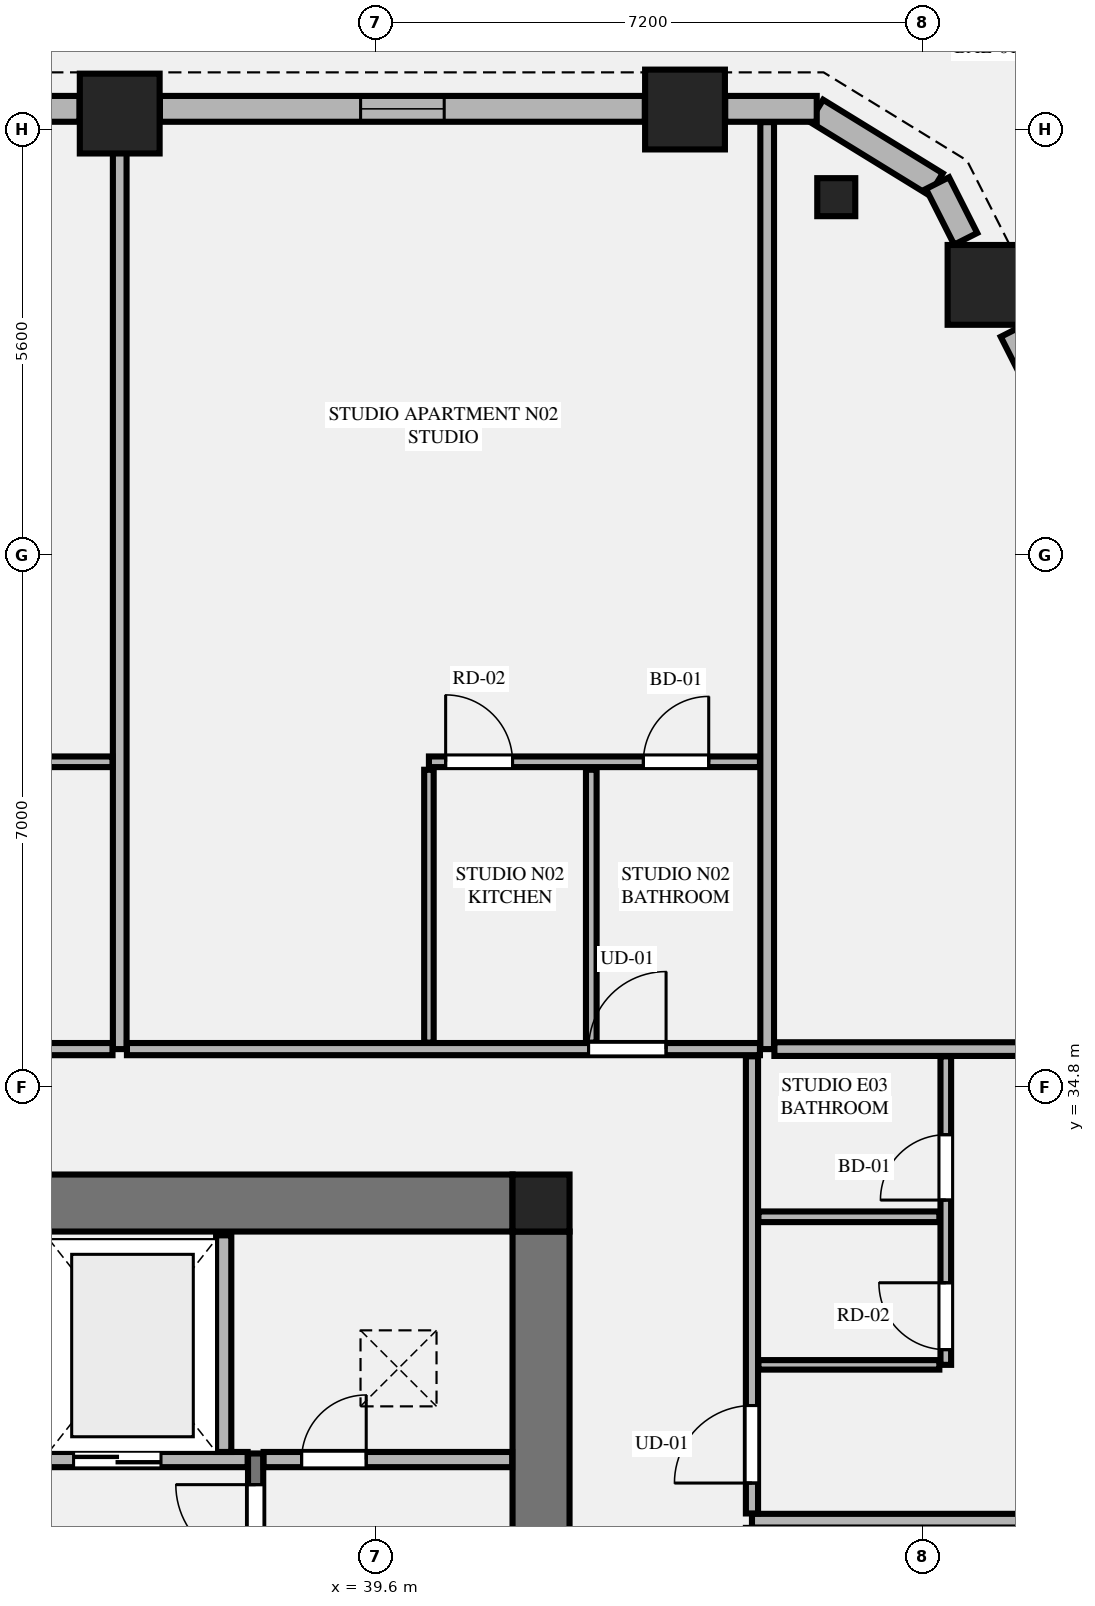
"""IFC4 building model, lengths in metres.
Left out: names, types, materials, properties, quantities, classifications, styles, units other than length and angle.
Written with IfcOpenShell. Run it as: python <this file> out.ifc"""

import sys

from ifc_helpers import new_model, si_unit, direction, frame, frame_2d, origin, origin_2d, place, context, subcontext, project, spatial, rectangle, extrude, element, fill, save


model = new_model("IFC4")
c1 = context("Model", 3, precision=1e-05, world=origin(), true_north=direction((0.0, 1.0)))
c2 = subcontext(c1, "Body", "Model", "MODEL_VIEW")
j1 = project(units=[si_unit("LENGTHUNIT", "METRE"), si_unit("PLANEANGLEUNIT", "RADIAN")], contexts=[c1])
p1 = place(None, origin())
s1 = spatial("IfcSite", under=j1, at=p1, CompositionType="ELEMENT")
p2 = place(p1, origin())
s2 = spatial("IfcBuilding", under=s1, at=p2, CompositionType="ELEMENT")
p3 = place(p2, frame((0.0, 0.0, 98.4)))
s3 = spatial("IfcBuildingStorey", under=s2, at=p3, CompositionType="ELEMENT", Elevation=98.4)
p4 = place(p3, frame((41.775, 33.275, 0.0), z_axis=(0.0, 0.0, 1.0), x_axis=(1.0, 0.0, 0.0)))
e1 = element("IfcColumn", 1, at=p4, inside=s3, PredefinedType="COLUMN", context=c2, shape_type="SweptSolid", body=[
    extrude(rectangle(XDim=0.75, YDim=0.75, at=origin_2d()), origin(), (0.0, 0.0, 1.0), 3.55),
])
p5 = place(p3, frame((23.4, 33.275, 0.0), z_axis=(0.0, 0.0, 1.0), x_axis=(1.0, 0.0, 0.0)))
e2 = element("IfcWall", 2, at=p5, inside=s3, PredefinedType="SHEAR", context=c2, shape_type="SweptSolid", body=[
    extrude(rectangle(XDim=18.0, YDim=0.75, at=frame_2d((9.0, 0.0))), origin(), (0.0, 0.0, 1.0), 3.34),
])
p6 = place(p3, frame((41.775, 18.9, 0.0), z_axis=(0.0, 0.0, 1.0), x_axis=(0.0, 1.0, 0.0)))
e3 = element("IfcWall", 3, at=p6, inside=s3, PredefinedType="SHEAR", context=c2, shape_type="SweptSolid", body=[
    extrude(rectangle(XDim=14.0, YDim=0.75, at=frame_2d((7.0, 0.0))), origin(), (0.0, 0.0, 1.0), 3.34),
])
p7 = place(p6, frame((2.94, 0.0, 0.0)))
e4 = element("IfcOpeningElement", 4, at=p7, cuts=e3, PredefinedType="OPENING", context=c2, shape_type="SweptSolid", body=[
    extrude(rectangle(XDim=1.22, YDim=2.25, at=frame_2d((0.61, 1.125))), frame((0.0, 0.385, 0.0), z_axis=(0.0, -1.0, 0.0), x_axis=(1.0, 0.0, 0.0)), (0.0, 0.0, 1.0), 0.77),
])
for number, where, z_axis, x_axis in (
    (5, (47.649, 45.354, 0.0), (0.0, 0.0, 1.0), (1.0, 0.0, 0.0)),
    (6, (43.669, 47.661, 0.0), (0.0, 0.0, 1.0), (1.0, 0.0, 0.0)),
    (7, (36.232, 47.608, 0.0), (0.0, 0.0, 1.0), (1.0, 0.0, 0.0)),
):
    element("IfcColumn", number, at=place(p3, frame(where, z_axis=z_axis, x_axis=x_axis)), inside=s3, PredefinedType="COLUMN", context=c2, shape_type="SweptSolid", body=[
        extrude(rectangle(XDim=1.05, YDim=1.05, at=origin_2d()), origin(), (0.0, 0.0, 1.0), 3.55),
    ])
p8 = place(p3, frame((45.659, 46.508, 0.0), z_axis=(0.0, 0.0, 1.0), x_axis=(-0.865160173452, 0.501495637342, 0.0)))
e8 = element("IfcColumn", 8, at=p8, inside=s3, PredefinedType="PILASTER", context=c2, shape_type="SweptSolid", body=[
    extrude(rectangle(XDim=0.5, YDim=0.35, at=origin_2d()), origin(), (0.0, 0.0, 1.0), 3.55),
])
p9 = place(p3, frame((38.02, 23.2, 0.0), z_axis=(0.0, 0.0, 1.0), x_axis=(0.0, 1.0, 0.0)))
e9 = element("IfcWall", 9, at=p9, inside=s3, PredefinedType="SHEAR", context=c2, shape_type="SweptSolid", body=[
    extrude(rectangle(XDim=6.78, YDim=0.2, at=frame_2d((3.39, 0.0))), origin(), (0.0, 0.0, 1.0), 3.55),
])
p10 = place(p9, frame((5.32, 0.0, 0.0)))
e10 = element("IfcOpeningElement", 10, at=p10, cuts=e9, PredefinedType="OPENING", context=c2, shape_type="SweptSolid", body=[
    extrude(rectangle(XDim=1.05, YDim=2.15, at=frame_2d((0.525, 1.075))), frame((0.0, 0.11, 0.0), z_axis=(0.0, -1.0, 0.0), x_axis=(1.0, 0.0, 0.0)), (0.0, 0.0, 1.0), 0.22),
])
p11 = place(p3, frame((34.9, 29.9, 0.0), z_axis=(0.0, 0.0, 1.0), x_axis=(1.0, 0.0, 0.0)))
e11 = element("IfcWall", 11, at=p11, inside=s3, PredefinedType="PLUMBINGWALL", context=c2, shape_type="SweptSolid", body=[
    extrude(rectangle(XDim=3.015, YDim=0.2, at=frame_2d((1.508, 0.0))), origin(), (0.0, 0.0, 1.0), 3.34),
])
p12 = place(p11, frame((0.725, 0.0, 0.0)))
e12 = element("IfcOpeningElement", 12, at=p12, cuts=e11, PredefinedType="OPENING", context=c2, shape_type="SweptSolid", body=[
    extrude(rectangle(XDim=1.15, YDim=2.2, at=frame_2d((0.575, 1.1))), frame((0.0, 0.11, 0.0), z_axis=(0.0, -1.0, 0.0), x_axis=(1.0, 0.0, 0.0)), (0.0, 0.0, 1.0), 0.22),
])
p13 = place(p3, frame((38.125, 29.9, 0.0), z_axis=(0.0, 0.0, 1.0), x_axis=(1.0, 0.0, 0.0)))
e13 = element("IfcWall", 13, at=p13, inside=s3, PredefinedType="PLUMBINGWALL", context=c2, shape_type="SweptSolid", body=[
    extrude(rectangle(XDim=3.27, YDim=0.2, at=frame_2d((1.635, 0.0))), origin(), (0.0, 0.0, 1.0), 3.34),
])
p14 = place(p13, frame((0.5, 0.0, 0.0)))
e14 = element("IfcOpeningElement", 14, at=p14, cuts=e13, PredefinedType="OPENING", context=c2, shape_type="SweptSolid", body=[
    extrude(rectangle(XDim=0.85, YDim=2.05, at=frame_2d((0.425, 1.025))), frame((0.0, 0.11, 0.0), z_axis=(0.0, -1.0, 0.0), x_axis=(1.0, 0.0, 0.0)), (0.0, 0.0, 1.0), 0.22),
])
p15 = place(p3, frame((37.6, 30.0, 0.0), z_axis=(0.0, 0.0, 1.0), x_axis=(0.0, 1.0, 0.0)))
e15 = element("IfcWall", 15, at=p15, inside=s3, PredefinedType="PLUMBINGWALL", context=c2, shape_type="SweptSolid", body=[
    extrude(rectangle(XDim=2.85, YDim=0.2, at=frame_2d((1.425, 0.0))), origin(), (0.0, 0.0, 1.0), 3.34),
])
p16 = place(p3, frame((46.971, 46.677, 0.0), z_axis=(0.0, 0.0, 1.0), x_axis=(-0.851798915137, 0.523868884523, 0.0)))
e16 = element("IfcWall", 16, at=p16, inside=s3, PredefinedType="STANDARD", context=c2, shape_type="SweptSolid", body=[
    extrude(rectangle(XDim=1.848, YDim=0.34, at=frame_2d((0.924, 0.0))), origin(), (0.0, 0.0, 1.0), 3.34),
])
p17 = place(p3, frame((50.251, 40.251, 0.0), z_axis=(0.0, 0.0, 1.0), x_axis=(-0.451548465867, 0.892246593142, 0.0)))
e17 = element("IfcWall", 17, at=p17, inside=s3, PredefinedType="STANDARD", context=c2, shape_type="SweptSolid", body=[
    extrude(rectangle(XDim=5.04, YDim=0.34, at=frame_2d((2.52, 0.0))), origin(), (0.0, 0.0, 1.0), 2.797),
])
p18 = place(p17, frame((1.97, 0.0, 0.75)))
e18 = element("IfcOpeningElement", 18, at=p18, cuts=e17, PredefinedType="OPENING", context=c2, shape_type="SweptSolid", body=[
    extrude(rectangle(XDim=1.1, YDim=1.897, at=frame_2d((0.55, 0.948))), frame((0.0, 0.18, 0.0), z_axis=(0.0, -1.0, 0.0), x_axis=(1.0, 0.0, 0.0)), (0.0, 0.0, 1.0), 0.36),
])
p19 = place(p3, frame((47.362, 45.96, 0.0), z_axis=(0.0, 0.0, 1.0), x_axis=(-0.45160540153, 0.89221777684, 0.0)))
e19 = element("IfcWall", 19, at=p19, inside=s3, PredefinedType="STANDARD", context=c2, shape_type="SweptSolid", body=[
    extrude(rectangle(XDim=0.822, YDim=0.34, at=frame_2d((0.411, 0.0))), origin(), (0.0, 0.0, 1.0), 3.34),
])
p20 = place(p3, frame((45.402, 47.67, 0.0), z_axis=(0.0, 0.0, 1.0), x_axis=(-1.0, 0.0, 0.0)))
e20 = element("IfcWall", 20, at=p20, inside=s3, PredefinedType="STANDARD", context=c2, shape_type="SweptSolid", body=[
    extrude(rectangle(XDim=1.204, YDim=0.34, at=frame_2d((0.602, 0.0))), origin(), (0.0, 0.0, 1.0), 3.34),
])
p21 = place(p3, frame((43.14, 47.67, 0.0), z_axis=(0.0, 0.0, 1.0), x_axis=(-1.0, 0.0, 0.0)))
e21 = element("IfcWall", 21, at=p21, inside=s3, PredefinedType="STANDARD", context=c2, shape_type="SweptSolid", body=[
    extrude(rectangle(XDim=6.379, YDim=0.34, at=frame_2d((3.189, 0.0))), origin(), (0.0, 0.0, 1.0), 2.797),
])
p22 = place(p21, frame((2.639, 0.0, 0.75)))
e22 = element("IfcOpeningElement", 22, at=p22, cuts=e21, PredefinedType="OPENING", context=c2, shape_type="SweptSolid", body=[
    extrude(rectangle(XDim=1.1, YDim=1.897, at=frame_2d((0.55, 0.948))), frame((0.0, 0.18, 0.0), z_axis=(0.0, -1.0, 0.0), x_axis=(1.0, 0.0, 0.0)), (0.0, 0.0, 1.0), 0.36),
])
p23 = place(p3, frame((35.703, 47.67, 0.0), z_axis=(0.0, 0.0, 1.0), x_axis=(-1.0, 0.0, 0.0)))
e23 = element("IfcWall", 23, at=p23, inside=s3, PredefinedType="STANDARD", context=c2, shape_type="SweptSolid", body=[
    extrude(rectangle(XDim=6.606, YDim=0.34, at=frame_2d((3.303, 0.0))), origin(), (0.0, 0.0, 1.0), 2.797),
])
p24 = place(p23, frame((2.553, 0.0, 0.0)))
e24 = element("IfcOpeningElement", 24, at=p24, cuts=e23, PredefinedType="OPENING", context=c2, shape_type="SweptSolid", body=[
    extrude(rectangle(XDim=1.5, YDim=2.3, at=frame_2d((0.75, 1.15))), frame((0.0, 0.18, 0.0), z_axis=(0.0, -1.0, 0.0), x_axis=(1.0, 0.0, 0.0)), (0.0, 0.0, 1.0), 0.36),
])
p25 = place(p3, frame((36.232, 35.3, 0.0), z_axis=(0.0, 0.0, 1.0), x_axis=(0.0, 1.0, 0.0)))
e25 = element("IfcWall", 25, at=p25, inside=s3, PredefinedType="PARTITIONING", context=c2, shape_type="SweptSolid", body=[
    extrude(rectangle(XDim=12.195, YDim=0.18, at=frame_2d((6.098, 0.0))), origin(), (0.0, 0.0, 1.0), 2.722),
])
p26 = place(p3, frame((44.75, 35.3, 0.0), z_axis=(0.0, 0.0, 1.0), x_axis=(0.0, 1.0, 0.0)))
e26 = element("IfcWall", 26, at=p26, inside=s3, PredefinedType="PARTITIONING", context=c2, shape_type="SweptSolid", body=[
    extrude(rectangle(XDim=12.195, YDim=0.18, at=frame_2d((6.098, 0.0))), origin(), (0.0, 0.0, 1.0), 3.34),
])
p27 = place(p3, frame((20.145, 35.3, 0.0), z_axis=(0.0, 0.0, 1.0), x_axis=(1.0, 0.0, 0.0)))
e27 = element("IfcWall", 27, at=p27, inside=s3, PredefinedType="PARTITIONING", context=c2, shape_type="SweptSolid", body=[
    extrude(rectangle(XDim=15.992, YDim=0.16, at=frame_2d((7.996, 0.0))), origin(), (0.0, 0.0, 1.0), 3.34),
])
p28 = place(p27, frame((0.405, 0.0, 0.0)))
e28 = element("IfcOpeningElement", 28, at=p28, cuts=e27, PredefinedType="OPENING", context=c2, shape_type="SweptSolid", body=[
    extrude(rectangle(XDim=1.02, YDim=2.25, at=frame_2d((0.51, 1.125))), frame((0.0, 0.09, 0.0), z_axis=(0.0, -1.0, 0.0), x_axis=(1.0, 0.0, 0.0)), (0.0, 0.0, 1.0), 0.18),
])
p29 = place(p3, frame((22.1, 39.08, 0.0), z_axis=(0.0, 0.0, 1.0), x_axis=(1.0, 0.0, 0.0)))
e29 = element("IfcWall", 29, at=p29, inside=s3, PredefinedType="PLUMBINGWALL", context=c2, shape_type="SweptSolid", body=[
    extrude(rectangle(XDim=14.037, YDim=0.14, at=frame_2d((7.019, 0.0))), origin(), (0.0, 0.0, 1.0), 3.34),
])
p30 = place(p29, frame((3.68, 0.0, 0.0)))
e30 = element("IfcOpeningElement", 30, at=p30, cuts=e29, PredefinedType="OPENING", context=c2, shape_type="SweptSolid", body=[
    extrude(rectangle(XDim=0.86, YDim=2.1, at=frame_2d((0.43, 1.05))), frame((0.0, 0.08, 0.0), z_axis=(0.0, -1.0, 0.0), x_axis=(1.0, 0.0, 0.0)), (0.0, 0.0, 1.0), 0.16),
])
p31 = place(p29, frame((7.492, 0.0, 0.0)))
e31 = element("IfcOpeningElement", 31, at=p31, cuts=e29, PredefinedType="OPENING", context=c2, shape_type="SweptSolid", body=[
    extrude(rectangle(XDim=0.88, YDim=2.15, at=frame_2d((0.44, 1.075))), frame((0.0, 0.08, 0.0), z_axis=(0.0, -1.0, 0.0), x_axis=(1.0, 0.0, 0.0)), (0.0, 0.0, 1.0), 0.16),
])
p32 = place(p29, frame((0.22, 0.0, 0.0)))
e32 = element("IfcOpeningElement", 32, at=p32, cuts=e29, PredefinedType="OPENING", context=c2, shape_type="SweptSolid", body=[
    extrude(rectangle(XDim=0.88, YDim=2.15, at=frame_2d((0.44, 1.075))), frame((0.0, 0.08, 0.0), z_axis=(0.0, -1.0, 0.0), x_axis=(1.0, 0.0, 0.0)), (0.0, 0.0, 1.0), 0.16),
])
p33 = place(p3, frame((36.327, 35.3, 0.0), z_axis=(0.0, 0.0, 1.0), x_axis=(1.0, 0.0, 0.0)))
e33 = element("IfcWall", 33, at=p33, inside=s3, PredefinedType="PARTITIONING", context=c2, shape_type="SweptSolid", body=[
    extrude(rectangle(XDim=8.328, YDim=0.16, at=frame_2d((4.164, 0.0))), origin(), (0.0, 0.0, 1.0), 3.34),
])
p34 = place(p33, frame((6.073, 0.0, 0.0)))
e34 = element("IfcOpeningElement", 34, at=p34, cuts=e33, PredefinedType="OPENING", context=c2, shape_type="SweptSolid", body=[
    extrude(rectangle(XDim=1.02, YDim=2.25, at=frame_2d((0.51, 1.125))), frame((0.0, 0.09, 0.0), z_axis=(0.0, -1.0, 0.0), x_axis=(1.0, 0.0, 0.0)), (0.0, 0.0, 1.0), 0.18),
])
p35 = place(p3, frame((40.3, 35.385, 0.0), z_axis=(0.0, 0.0, 1.0), x_axis=(0.0, 1.0, 0.0)))
e35 = element("IfcWall", 35, at=p35, inside=s3, PredefinedType="PARTITIONING", context=c2, shape_type="SweptSolid", body=[
    extrude(rectangle(XDim=3.59, YDim=0.125, at=frame_2d((1.795, 0.0))), origin(), (0.0, 0.0, 1.0), 3.34),
])
p36 = place(p3, frame((40.3, 39.08, 0.0), z_axis=(0.0, 0.0, 1.0), x_axis=(1.0, 0.0, 0.0)))
e36 = element("IfcWall", 36, at=p36, inside=s3, PredefinedType="PLUMBINGWALL", context=c2, shape_type="SweptSolid", body=[
    extrude(rectangle(XDim=4.355, YDim=0.14, at=frame_2d((2.177, 0.0))), origin(), (0.0, 0.0, 1.0), 3.34),
])
p37 = place(p36, frame((2.821, 0.0, 0.0)))
e37 = element("IfcOpeningElement", 37, at=p37, cuts=e36, PredefinedType="OPENING", context=c2, shape_type="SweptSolid", body=[
    extrude(rectangle(XDim=0.86, YDim=2.1, at=frame_2d((0.43, 1.05))), frame((0.0, 0.08, 0.0), z_axis=(0.0, -1.0, 0.0), x_axis=(1.0, 0.0, 0.0)), (0.0, 0.0, 1.0), 0.16),
])
p38 = place(p36, frame((0.22, 0.0, 0.0)))
e38 = element("IfcOpeningElement", 38, at=p38, cuts=e36, PredefinedType="OPENING", context=c2, shape_type="SweptSolid", body=[
    extrude(rectangle(XDim=0.88, YDim=2.15, at=frame_2d((0.44, 1.075))), frame((0.0, 0.08, 0.0), z_axis=(0.0, -1.0, 0.0), x_axis=(1.0, 0.0, 0.0)), (0.0, 0.0, 1.0), 0.16),
])
p39 = place(p3, frame((42.436, 35.385, 0.0), z_axis=(0.0, 0.0, 1.0), x_axis=(0.0, 1.0, 0.0)))
e39 = element("IfcWall", 39, at=p39, inside=s3, PredefinedType="PLUMBINGWALL", context=c2, shape_type="SweptSolid", body=[
    extrude(rectangle(XDim=3.59, YDim=0.14, at=frame_2d((1.795, 0.0))), origin(), (0.0, 0.0, 1.0), 2.722),
])
p40 = place(p3, frame((44.845, 35.3, 0.0), z_axis=(0.0, 0.0, 1.0), x_axis=(1.0, 0.0, 0.0)))
e40 = element("IfcWall", 40, at=p40, inside=s3, PredefinedType="PARTITIONING", context=c2, shape_type="SweptSolid", body=[
    extrude(rectangle(XDim=7.669, YDim=0.18, at=frame_2d((3.834, 0.0))), origin(), (0.0, 0.0, 1.0), 3.34),
])
p41 = place(p3, frame((44.55, 29.096, 0.0), z_axis=(0.0, 0.0, 1.0), x_axis=(1.0, 0.0, 0.0)))
e41 = element("IfcWall", 41, at=p41, inside=s3, PredefinedType="PARTITIONING", context=c2, shape_type="SweptSolid", body=[
    extrude(rectangle(XDim=11.103, YDim=0.18, at=frame_2d((5.552, 0.0))), origin(), (0.0, 0.0, 1.0), 3.34),
])
p42 = place(p3, frame((44.55, 29.191, 0.0), z_axis=(0.0, 0.0, 1.0), x_axis=(0.0, 1.0, 0.0)))
e42 = element("IfcWall", 42, at=p42, inside=s3, PredefinedType="PARTITIONING", context=c2, shape_type="SweptSolid", body=[
    extrude(rectangle(XDim=6.014, YDim=0.16, at=frame_2d((3.007, 0.0))), origin(), (0.0, 0.0, 1.0), 3.34),
])
p43 = place(p42, frame((0.4, 0.0, 0.0)))
e43 = element("IfcOpeningElement", 43, at=p43, cuts=e42, PredefinedType="OPENING", context=c2, shape_type="SweptSolid", body=[
    extrude(rectangle(XDim=1.02, YDim=2.25, at=frame_2d((0.51, 1.125))), frame((0.0, 0.09, 0.0), z_axis=(0.0, -1.0, 0.0), x_axis=(1.0, 0.0, 0.0)), (0.0, 0.0, 1.0), 0.18),
])
p44 = place(p3, frame((44.635, 31.146, 0.0), z_axis=(0.0, 0.0, 1.0), x_axis=(1.0, 0.0, 0.0)))
e44 = element("IfcWall", 44, at=p44, inside=s3, PredefinedType="PARTITIONING", context=c2, shape_type="SweptSolid", body=[
    extrude(rectangle(XDim=2.38, YDim=0.125, at=frame_2d((1.19, 0.0))), origin(), (0.0, 0.0, 1.0), 3.34),
])
p45 = place(p3, frame((47.1, 31.146, 0.0), z_axis=(0.0, 0.0, 1.0), x_axis=(0.0, 1.0, 0.0)))
e45 = element("IfcWall", 45, at=p45, inside=s3, PredefinedType="PLUMBINGWALL", context=c2, shape_type="SweptSolid", body=[
    extrude(rectangle(XDim=4.059, YDim=0.14, at=frame_2d((2.03, 0.0))), origin(), (0.0, 0.0, 1.0), 3.34),
])
p46 = place(p45, frame((2.168, 0.0, 0.0)))
e46 = element("IfcOpeningElement", 46, at=p46, cuts=e45, PredefinedType="OPENING", context=c2, shape_type="SweptSolid", body=[
    extrude(rectangle(XDim=0.86, YDim=2.1, at=frame_2d((0.43, 1.05))), frame((0.0, 0.08, 0.0), z_axis=(0.0, -1.0, 0.0), x_axis=(1.0, 0.0, 0.0)), (0.0, 0.0, 1.0), 0.16),
])
p47 = place(p45, frame((0.2, 0.0, 0.0)))
e47 = element("IfcOpeningElement", 47, at=p47, cuts=e45, PredefinedType="OPENING", context=c2, shape_type="SweptSolid", body=[
    extrude(rectangle(XDim=0.88, YDim=2.15, at=frame_2d((0.44, 1.075))), frame((0.0, 0.08, 0.0), z_axis=(0.0, -1.0, 0.0), x_axis=(1.0, 0.0, 0.0)), (0.0, 0.0, 1.0), 0.16),
])
p48 = place(p3, frame((44.635, 33.094, 0.0), z_axis=(0.0, 0.0, 1.0), x_axis=(1.0, 0.0, 0.0)))
e48 = element("IfcWall", 48, at=p48, inside=s3, PredefinedType="PLUMBINGWALL", context=c2, shape_type="SweptSolid", body=[
    extrude(rectangle(XDim=2.38, YDim=0.14, at=frame_2d((1.19, 0.0))), origin(), (0.0, 0.0, 1.0), 3.34),
])
p49 = place(p10, origin())
e49 = element("IfcDoor", 49, at=p49, inside=s3, OperationType="SINGLE_SWING_RIGHT", PredefinedType="DOOR", context=c2, shape_type="SweptSolid", body=[
    extrude(rectangle(XDim=1.05, YDim=2.15, at=frame_2d((0.525, 1.075))), frame((0.0, 0.025, 0.0), z_axis=(0.0, -1.0, 0.0), x_axis=(1.0, 0.0, 0.0)), (0.0, 0.0, 1.0), 0.05),
])
fill(e10, e49)
p50 = place(p14, origin())
e50 = element("IfcDoor", 50, at=p50, inside=s3, OperationType="SINGLE_SWING_RIGHT", PredefinedType="DOOR", context=c2, shape_type="SweptSolid", body=[
    extrude(rectangle(XDim=0.85, YDim=2.05, at=frame_2d((0.425, 1.025))), frame((0.0, 0.025, 0.0), z_axis=(0.0, -1.0, 0.0), x_axis=(1.0, 0.0, 0.0)), (0.0, 0.0, 1.0), 0.05),
])
fill(e14, e50)
p51 = place(p12, origin())
e51 = element("IfcDoor", 51, at=p51, inside=s3, OperationType="DOUBLE_DOOR_SLIDING", PredefinedType="DOOR", context=c2, shape_type="SweptSolid", body=[
    extrude(rectangle(XDim=1.15, YDim=2.2, at=frame_2d((0.575, 1.1))), frame((0.0, 0.025, 0.0), z_axis=(0.0, -1.0, 0.0), x_axis=(1.0, 0.0, 0.0)), (0.0, 0.0, 1.0), 0.05),
])
fill(e12, e51)
p52 = place(p22, origin())
e52 = element("IfcWindow", 52, at=p52, inside=s3, PartitioningType="SINGLE_PANEL", PredefinedType="WINDOW", context=c2, shape_type="SweptSolid", body=[
    extrude(rectangle(XDim=1.1, YDim=1.897, at=frame_2d((0.55, 0.948))), frame((0.0, 0.03, 0.0), z_axis=(0.0, -1.0, 0.0), x_axis=(1.0, 0.0, 0.0)), (0.0, 0.0, 1.0), 0.06),
])
fill(e22, e52)
p53 = place(p37, origin())
e53 = element("IfcDoor", 53, at=p53, inside=s3, OperationType="SINGLE_SWING_RIGHT", PredefinedType="DOOR", context=c2, shape_type="SweptSolid", body=[
    extrude(rectangle(XDim=0.86, YDim=2.1, at=frame_2d((0.43, 1.05))), frame((0.0, 0.025, 0.0), z_axis=(0.0, -1.0, 0.0), x_axis=(1.0, 0.0, 0.0)), (0.0, 0.0, 1.0), 0.05),
])
fill(e37, e53)
p54 = place(p34, origin())
e54 = element("IfcDoor", 54, at=p54, inside=s3, OperationType="SINGLE_SWING_RIGHT", PredefinedType="DOOR", context=c2, shape_type="SweptSolid", body=[
    extrude(rectangle(XDim=1.02, YDim=2.25, at=frame_2d((0.51, 1.125))), frame((0.0, 0.025, 0.0), z_axis=(0.0, -1.0, 0.0), x_axis=(1.0, 0.0, 0.0)), (0.0, 0.0, 1.0), 0.05),
])
fill(e34, e54)
p55 = place(p38, origin())
e55 = element("IfcDoor", 55, at=p55, inside=s3, OperationType="SINGLE_SWING_LEFT", PredefinedType="DOOR", context=c2, shape_type="SweptSolid", body=[
    extrude(rectangle(XDim=0.88, YDim=2.15, at=frame_2d((0.44, 1.075))), frame((0.0, 0.025, 0.0), z_axis=(0.0, -1.0, 0.0), x_axis=(1.0, 0.0, 0.0)), (0.0, 0.0, 1.0), 0.05),
])
fill(e38, e55)
p56 = place(p46, origin())
e56 = element("IfcDoor", 56, at=p56, inside=s3, OperationType="SINGLE_SWING_LEFT", PredefinedType="DOOR", context=c2, shape_type="SweptSolid", body=[
    extrude(rectangle(XDim=0.86, YDim=2.1, at=frame_2d((0.43, 1.05))), frame((0.0, 0.025, 0.0), z_axis=(0.0, -1.0, 0.0), x_axis=(1.0, 0.0, 0.0)), (0.0, 0.0, 1.0), 0.05),
])
fill(e46, e56)
p57 = place(p43, origin())
e57 = element("IfcDoor", 57, at=p57, inside=s3, OperationType="SINGLE_SWING_LEFT", PredefinedType="DOOR", context=c2, shape_type="SweptSolid", body=[
    extrude(rectangle(XDim=1.02, YDim=2.25, at=frame_2d((0.51, 1.125))), frame((0.0, 0.025, 0.0), z_axis=(0.0, -1.0, 0.0), x_axis=(1.0, 0.0, 0.0)), (0.0, 0.0, 1.0), 0.05),
])
fill(e43, e57)
p58 = place(p47, origin())
e58 = element("IfcDoor", 58, at=p58, inside=s3, OperationType="SINGLE_SWING_RIGHT", PredefinedType="DOOR", context=c2, shape_type="SweptSolid", body=[
    extrude(rectangle(XDim=0.88, YDim=2.15, at=frame_2d((0.44, 1.075))), frame((0.0, 0.025, 0.0), z_axis=(0.0, -1.0, 0.0), x_axis=(1.0, 0.0, 0.0)), (0.0, 0.0, 1.0), 0.05),
])
fill(e47, e58)
save(model, sys.argv[1])
